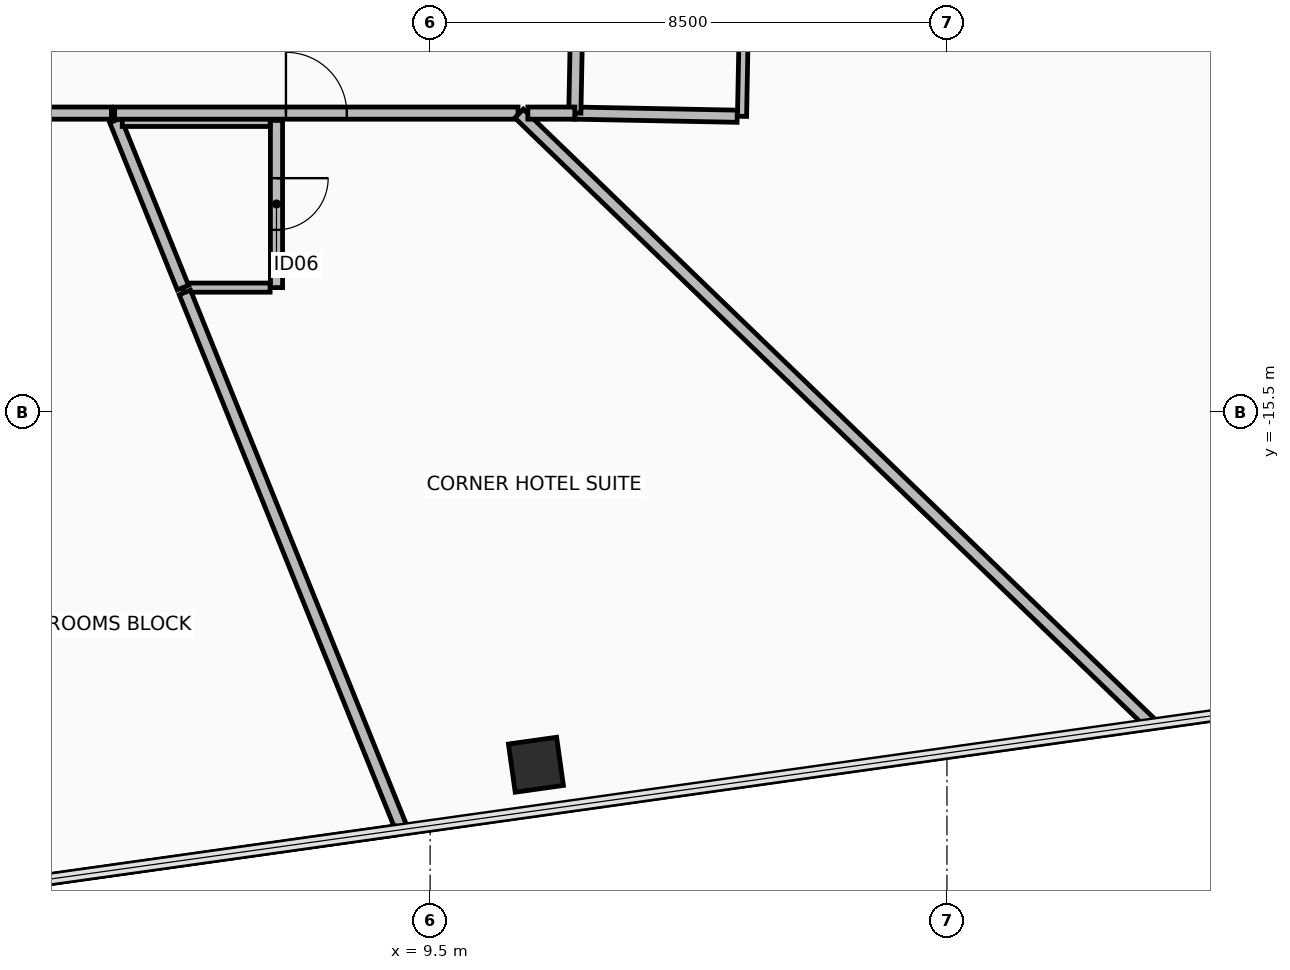
"""IFC4 building model, lengths in metres.
Left out: names, types, materials, properties, quantities, classifications, styles, units other than length and angle.
Written with IfcOpenShell. Run it as: python <this file> out.ifc"""

import sys

from ifc_helpers import new_model, si_unit, direction, frame, frame_2d, origin, origin_2d, place, context, subcontext, project, spatial, rectangle, hollow_rectangle, extrude, element, fill, save


model = new_model("IFC4")
c1 = context("Model", 3, precision=1e-05, world=origin(), true_north=direction((0.0, 1.0)))
c2 = subcontext(c1, "Body", "Model", "MODEL_VIEW")
j1 = project(units=[si_unit("LENGTHUNIT", "METRE"), si_unit("PLANEANGLEUNIT", "RADIAN")], contexts=[c1])
p1 = place(None, origin())
s1 = spatial("IfcSite", under=j1, at=p1, CompositionType="ELEMENT")
p2 = place(p1, origin())
s2 = spatial("IfcBuilding", under=s1, at=p2, CompositionType="ELEMENT")
p3 = place(p2, frame((0.0, 0.0, 60.45)))
s3 = spatial("IfcBuildingStorey", under=s2, at=p3, CompositionType="ELEMENT", Elevation=60.45)
p4 = place(p3, frame((11.24, -21.296, 0.0), z_axis=(0.0, 0.0, 1.0), x_axis=(0.990268068742, 0.13917310096, 0.0)))
e1 = element("IfcColumn", 1, at=p4, inside=s3, PredefinedType="COLUMN", context=c2, shape_type="SweptSolid", body=[
    extrude(hollow_rectangle(XDim=0.8, YDim=0.8, WallThickness=0.045, at=origin_2d()), origin(), (0.0, 0.0, 1.0), 3.4),
])
p5 = place(p3, frame((6.973, -10.7, 0.0), z_axis=(0.0, 0.0, 1.0), x_axis=(0.0, -1.0, 0.0)))
e2 = element("IfcWall", 2, at=p5, inside=s3, PredefinedType="PARTITIONING", context=c2, shape_type="SweptSolid", body=[
    extrude(rectangle(XDim=2.75, YDim=0.2, at=frame_2d((1.375, 0.0))), origin(), (0.0, 0.0, 1.0), 3.225),
])
p6 = place(p5, frame((0.95, 0.0, 0.0)))
e3 = element("IfcOpeningElement", 3, at=p6, cuts=e2, PredefinedType="OPENING", context=c2, shape_type="SweptSolid", body=[
    extrude(rectangle(XDim=0.85, YDim=2.1, at=frame_2d((0.425, 1.05))), frame((0.0, 0.11, 0.0), z_axis=(0.0, -1.0, 0.0), x_axis=(1.0, 0.0, 0.0)), (0.0, 0.0, 1.0), 0.22),
])
p7 = place(p3, frame((6.868, -13.45, 0.0), z_axis=(0.0, 0.0, 1.0), x_axis=(-1.0, 0.0, 0.0)))
e4 = element("IfcWall", 4, at=p7, inside=s3, PredefinedType="PARTITIONING", context=c2, shape_type="SweptSolid", body=[
    extrude(rectangle(XDim=1.434, YDim=0.15, at=frame_2d((0.717, 0.0))), origin(), (0.0, 0.0, 1.0), 3.225),
])
p8 = place(p3, frame((5.434, -13.45, 0.0), z_axis=(0.0, 0.0, 1.0), x_axis=(-0.374610031927, 0.927182465311, 0.0)))
e5 = element("IfcWall", 5, at=p8, inside=s3, PredefinedType="PARTITIONING", context=c2, shape_type="SweptSolid", body=[
    extrude(rectangle(XDim=2.966, YDim=0.2, at=frame_2d((1.483, 0.0))), origin(), (0.0, 0.0, 1.0), 3.225),
])
p9 = place(p3, frame((4.436, -10.7, 0.0), z_axis=(0.0, 0.0, 1.0), x_axis=(1.0, 0.0, 0.0)))
e6 = element("IfcWall", 6, at=p9, inside=s3, PredefinedType="PARTITIONING", context=c2, shape_type="SweptSolid", body=[
    extrude(rectangle(XDim=2.432, YDim=0.2, at=frame_2d((1.216, 0.0))), origin(), (0.0, 0.0, 1.0), 3.225),
])
p10 = place(p3, frame((14.681, -7.984, 0.0), z_axis=(0.0, 0.0, 1.0), x_axis=(-0.01934764942, -0.999812816712, 0.0)))
e7 = element("IfcWall", 7, at=p10, inside=s3, PredefinedType="PARTITIONING", context=c2, shape_type="SweptSolid", body=[
    extrude(rectangle(XDim=2.65, YDim=0.15, at=frame_2d((1.325, 0.0))), origin(), (0.0, 0.0, 1.0), 2.62),
])
p11 = place(p3, frame((14.55, -10.632, 0.0), z_axis=(0.0, 0.0, 1.0), x_axis=(-0.999813887268, 0.019292247848, 0.0)))
e8 = element("IfcWall", 8, at=p11, inside=s3, PredefinedType="PARTITIONING", context=c2, shape_type="SweptSolid", body=[
    extrude(rectangle(XDim=2.67, YDim=0.2, at=frame_2d((1.335, 0.0))), origin(), (0.0, 0.0, 1.0), 2.62),
])
p12 = place(p3, frame((11.88, -10.579, 0.0), z_axis=(0.0, 0.0, 1.0), x_axis=(0.019356564513, 0.999812644154, 0.0)))
e9 = element("IfcWall", 9, at=p12, inside=s3, PredefinedType="PARTITIONING", context=c2, shape_type="SweptSolid", body=[
    extrude(rectangle(XDim=2.649, YDim=0.2, at=frame_2d((1.324, 0.0))), origin(), (0.0, 0.0, 1.0), 2.62),
])
p13 = place(p3, frame((-0.345, -10.58, 0.0), z_axis=(0.0, 0.0, 1.0), x_axis=(1.0, 0.0, 0.0)))
e10 = element("IfcWall", 10, at=p13, inside=s3, PredefinedType="PARTITIONING", context=c2, shape_type="SweptSolid", body=[
    extrude(rectangle(XDim=4.603, YDim=0.2, at=frame_2d((2.302, 0.0))), origin(), (0.0, 0.0, 1.0), 3.225),
])
p14 = place(p13, frame((1.876, 0.0, 0.0)))
e11 = element("IfcOpeningElement", 11, at=p14, cuts=e10, PredefinedType="OPENING", context=c2, shape_type="SweptSolid", body=[
    extrude(rectangle(XDim=0.85, YDim=2.1, at=frame_2d((0.425, 1.05))), frame((0.0, 0.11, 0.0), z_axis=(0.0, -1.0, 0.0), x_axis=(1.0, 0.0, 0.0)), (0.0, 0.0, 1.0), 0.22),
])
p15 = place(p3, frame((5.467, -13.53, 0.0), z_axis=(0.0, 0.0, 1.0), x_axis=(0.374604987926, -0.927184503225, 0.0)))
e12 = element("IfcWall", 12, at=p15, inside=s3, PredefinedType="PARTITIONING", context=c2, shape_type="SweptSolid", body=[
    extrude(rectangle(XDim=9.527, YDim=0.2, at=frame_2d((4.763, 0.0))), origin(), (0.0, 0.0, 1.0), 2.42),
])
p16 = place(p3, frame((8.928, -22.378, 0.0), z_axis=(0.0, 0.0, 1.0), x_axis=(-0.990268034831, -0.139173342244, 0.0)))
e13 = element("IfcWall", 13, at=p16, inside=s3, PredefinedType="PARTITIONING", context=c2, shape_type="SweptSolid", body=[
    extrude(rectangle(XDim=9.824, YDim=0.15, at=frame_2d((4.912, 0.0))), origin(), (0.0, 0.0, 1.0), 3.225),
])
p17 = place(p3, frame((4.312, -10.58, 0.0), z_axis=(0.0, 0.0, 1.0), x_axis=(1.0, 0.0, 0.0)))
e14 = element("IfcWall", 14, at=p17, inside=s3, PredefinedType="PARTITIONING", context=c2, shape_type="SweptSolid", body=[
    extrude(rectangle(XDim=6.634, YDim=0.2, at=frame_2d((3.317, 0.0))), origin(), (0.0, 0.0, 1.0), 2.62),
])
p18 = place(p17, frame((2.817, 0.0, 0.0)))
e15 = element("IfcOpeningElement", 15, at=p18, cuts=e14, PredefinedType="OPENING", context=c2, shape_type="SweptSolid", body=[
    extrude(rectangle(XDim=1.0, YDim=2.15, at=frame_2d((0.5, 1.075))), frame((0.0, 0.11, 0.0), z_axis=(0.0, -1.0, 0.0), x_axis=(1.0, 0.0, 0.0)), (0.0, 0.0, 1.0), 0.22),
])
p19 = place(p3, frame((10.963, -10.587, 0.0), z_axis=(0.0, 0.0, 1.0), x_axis=(0.719333957275, -0.694664421077, 0.0)))
e16 = element("IfcWall", 16, at=p19, inside=s3, PredefinedType="PARTITIONING", context=c2, shape_type="SweptSolid", body=[
    extrude(rectangle(XDim=14.459, YDim=0.2, at=frame_2d((7.229, 0.0))), origin(), (0.0, 0.0, 1.0), 2.42),
])
p20 = place(p3, frame((16.71, -6.082, 0.0), z_axis=(0.0, 0.0, 1.0), x_axis=(0.939695147998, -0.342013199789, 0.0)))
e17 = element("IfcWall", 17, at=p20, inside=s3, PredefinedType="PARTITIONING", context=c2, shape_type="SweptSolid", body=[
    extrude(rectangle(XDim=11.827, YDim=0.2, at=frame_2d((5.914, 0.0))), origin(), (0.0, 0.0, 1.0), 2.42),
])
p21 = place(p3, frame((11.107, -10.58, 0.0), z_axis=(0.0, 0.0, 1.0), x_axis=(1.0, 0.0, 0.0)))
e18 = element("IfcWall", 18, at=p21, inside=s3, PredefinedType="PARTITIONING", context=c2, shape_type="SweptSolid", body=[
    extrude(rectangle(XDim=0.772, YDim=0.2, at=frame_2d((0.386, 0.0))), origin(), (0.0, 0.0, 1.0), 3.225),
])
p22 = place(p6, origin())
e19 = element("IfcDoor", 19, at=p22, inside=s3, OperationType="SINGLE_SWING_RIGHT", PredefinedType="DOOR", context=c2, shape_type="SweptSolid", body=[
    extrude(rectangle(XDim=0.85, YDim=2.1, at=frame_2d((0.425, 1.05))), frame((0.0, 0.025, 0.0), z_axis=(0.0, -1.0, 0.0), x_axis=(1.0, 0.0, 0.0)), (0.0, 0.0, 1.0), 0.05),
])
fill(e3, e19)
p23 = place(p18, origin())
e20 = element("IfcDoor", 20, at=p23, inside=s3, OperationType="SINGLE_SWING_LEFT", PredefinedType="DOOR", context=c2, shape_type="SweptSolid", body=[
    extrude(rectangle(XDim=1.0, YDim=2.15, at=frame_2d((0.5, 1.075))), frame((0.0, 0.025, 0.0), z_axis=(0.0, -1.0, 0.0), x_axis=(1.0, 0.0, 0.0)), (0.0, 0.0, 1.0), 0.05),
])
fill(e15, e20)
save(model, sys.argv[1])
